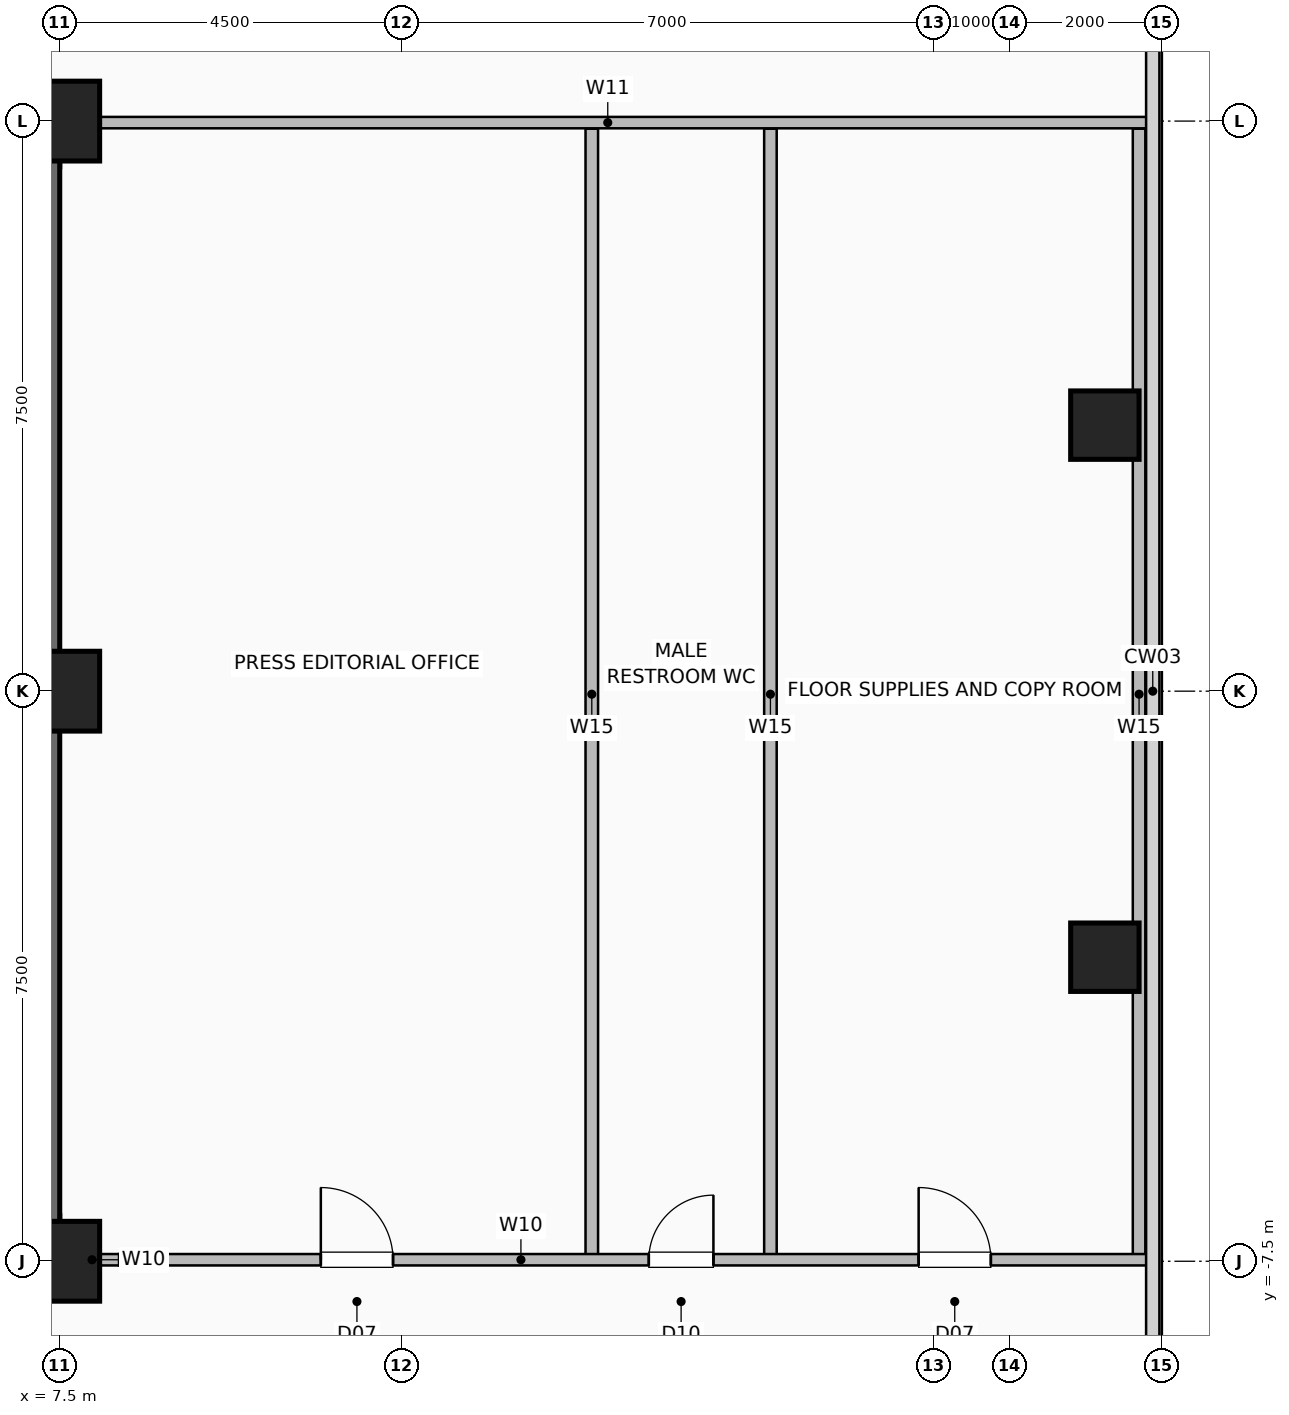
"""IFC4 building model, lengths in metres.
Left out: names, types, materials, properties, quantities, classifications, styles, units other than length and angle.
Written with IfcOpenShell. Run it as: python <this file> out.ifc"""

import sys

from ifc_helpers import new_model, si_unit, direction, frame, frame_2d, origin, origin_2d, place, context, subcontext, project, spatial, rectangle, hollow_rectangle, extrude, element, fill, save


model = new_model("IFC4")
c1 = context("Model", 3, precision=1e-05, world=origin(), true_north=direction((0.0, 1.0)))
c2 = subcontext(c1, "Body", "Model", "MODEL_VIEW")
j1 = project(units=[si_unit("LENGTHUNIT", "METRE"), si_unit("PLANEANGLEUNIT", "RADIAN")], contexts=[c1])
p1 = place(None, origin())
s1 = spatial("IfcSite", under=j1, at=p1, CompositionType="ELEMENT")
p2 = place(p1, origin())
s2 = spatial("IfcBuilding", under=s1, at=p2, CompositionType="ELEMENT")
p3 = place(p2, frame((0.0, 0.0, 119.2)))
s3 = spatial("IfcBuildingStorey", under=s2, at=p3, CompositionType="ELEMENT", Elevation=119.2)
for number, where, z_axis, x_axis in (
    (1, (7.5, -7.5, 0.0), (0.0, 0.0, 1.0), (1.0, 0.0, 0.0)),
    (2, (7.5, 0.0, 0.0), (0.0, 0.0, 1.0), (1.0, 0.0, 0.0)),
    (3, (7.5, 7.5, 0.0), (0.0, 0.0, 1.0), (1.0, 0.0, 0.0)),
):
    element("IfcColumn", number, at=place(p3, frame(where, z_axis=z_axis, x_axis=x_axis)), inside=s3, PredefinedType="COLUMN", context=c2, shape_type="SweptSolid", body=[
        extrude(hollow_rectangle(XDim=1.05, YDim=1.05, WallThickness=0.05, at=origin_2d()), origin(), (0.0, 0.0, 1.0), 3.6),
    ])
for number, where, z_axis, x_axis in (
    (4, (21.25, -3.5, 0.0), (0.0, 0.0, 1.0), (1.0, 0.0, 0.0)),
    (5, (21.25, 3.5, 0.0), (0.0, 0.0, 1.0), (1.0, 0.0, 0.0)),
):
    element("IfcColumn", number, at=place(p3, frame(where, z_axis=z_axis, x_axis=x_axis)), inside=s3, PredefinedType="COLUMN", context=c2, shape_type="SweptSolid", body=[
        extrude(hollow_rectangle(XDim=0.9, YDim=0.9, WallThickness=0.045, at=origin_2d()), origin(), (0.0, 0.0, 1.0), 3.6),
    ])
p4 = place(p3, frame((-7.5, -7.2, 0.0), z_axis=(0.0, 0.0, 1.0), x_axis=(1.0, 0.0, 0.0)))
e6 = element("IfcWall", 6, at=p4, inside=s3, PredefinedType="SHEAR", context=c2, shape_type="SweptSolid", body=[
    extrude(rectangle(XDim=15.0, YDim=0.6, at=frame_2d((7.5, 0.0))), origin(), (0.0, 0.0, 1.0), 3.36),
])
p5 = place(p4, frame((1.55, 0.0, 0.0)))
e7 = element("IfcOpeningElement", 7, at=p5, cuts=e6, PredefinedType="OPENING", context=c2, shape_type="SweptSolid", body=[
    extrude(rectangle(XDim=1.05, YDim=2.08, at=frame_2d((0.525, 1.04))), frame((0.0, 0.31, 0.0), z_axis=(0.0, -1.0, 0.0), x_axis=(1.0, 0.0, 0.0)), (0.0, 0.0, 1.0), 0.62),
])
p6 = place(p4, frame((12.4, 0.0, 0.0)))
e8 = element("IfcOpeningElement", 8, at=p6, cuts=e6, PredefinedType="OPENING", context=c2, shape_type="SweptSolid", body=[
    extrude(rectangle(XDim=1.05, YDim=2.08, at=frame_2d((0.525, 1.04))), frame((0.0, 0.31, 0.0), z_axis=(0.0, -1.0, 0.0), x_axis=(1.0, 0.0, 0.0)), (0.0, 0.0, 1.0), 0.62),
])
p7 = place(p4, frame((5.2, 0.0, 0.0)))
e9 = element("IfcOpeningElement", 9, at=p7, cuts=e6, PredefinedType="OPENING", context=c2, shape_type="SweptSolid", body=[
    extrude(rectangle(XDim=1.0, YDim=2.08, at=frame_2d((0.5, 1.04))), frame((0.0, 0.31, 0.0), z_axis=(0.0, -1.0, 0.0), x_axis=(1.0, 0.0, 0.0)), (0.0, 0.0, 1.0), 0.62),
])
p8 = place(p4, frame((8.65, 0.0, 0.0)))
e10 = element("IfcOpeningElement", 10, at=p8, cuts=e6, PredefinedType="OPENING", context=c2, shape_type="SweptSolid", body=[
    extrude(rectangle(XDim=1.0, YDim=2.08, at=frame_2d((0.5, 1.04))), frame((0.0, 0.31, 0.0), z_axis=(0.0, -1.0, 0.0), x_axis=(1.0, 0.0, 0.0)), (0.0, 0.0, 1.0), 0.62),
])
for number, where, z_axis, x_axis in (
    (11, (-7.5, 7.2, 0.0), (0.0, 0.0, 1.0), (1.0, 0.0, 0.0)),
    (12, (7.2, -7.5, 0.0), (0.0, 0.0, 1.0), (0.0, 1.0, 0.0)),
):
    element("IfcWall", number, at=place(p3, frame(where, z_axis=z_axis, x_axis=x_axis)), inside=s3, PredefinedType="SHEAR", context=c2, shape_type="SweptSolid", body=[
        extrude(rectangle(XDim=15.0, YDim=0.6, at=frame_2d((7.5, 0.0))), origin(), (0.0, 0.0, 1.0), 3.36),
    ])
p9 = place(p3, frame((7.45, -7.48, 0.0), z_axis=(0.0, 0.0, 1.0), x_axis=(1.0, 0.0, 0.0)))
e13 = element("IfcWall", 13, at=p9, inside=s3, PredefinedType="PARTITIONING", context=c2, shape_type="SweptSolid", body=[
    extrude(rectangle(XDim=0.95, YDim=0.15, at=frame_2d((0.475, 0.0))), origin(), (0.0, 0.0, 1.0), 3.36),
])
for number, where, z_axis, x_axis in (
    (14, (16.85, -7.48, 0.0), (0.0, 0.0, 1.0), (0.0, 1.0, 0.0)),
    (15, (14.5, -7.48, 0.0), (0.0, 0.0, 1.0), (0.0, 1.0, 0.0)),
    (16, (21.7, -7.48, 0.0), (0.0, 0.0, 1.0), (0.0, 1.0, 0.0)),
):
    element("IfcWall", number, at=place(p3, frame(where, z_axis=z_axis, x_axis=x_axis)), inside=s3, PredefinedType="PLUMBINGWALL", context=c2, shape_type="SweptSolid", body=[
        extrude(rectangle(XDim=14.88, YDim=0.165, at=frame_2d((7.44, 0.0))), origin(), (0.0, 0.0, 1.0), 3.36),
    ])
p10 = place(p3, frame((8.28, -7.48, 0.0), z_axis=(0.0, 0.0, 1.0), x_axis=(1.0, 0.0, 0.0)))
e17 = element("IfcWall", 17, at=p10, inside=s3, PredefinedType="PARTITIONING", context=c2, shape_type="SweptSolid", body=[
    extrude(rectangle(XDim=13.54, YDim=0.15, at=frame_2d((6.77, 0.0))), origin(), (0.0, 0.0, 1.0), 3.36),
])
p11 = place(p10, frame((2.655, 0.0, 0.0)))
e18 = element("IfcOpeningElement", 18, at=p11, cuts=e17, PredefinedType="OPENING", context=c2, shape_type="SweptSolid", body=[
    extrude(rectangle(XDim=0.95, YDim=2.06, at=frame_2d((0.475, 1.03))), frame((0.0, 0.085, 0.0), z_axis=(0.0, -1.0, 0.0), x_axis=(1.0, 0.0, 0.0)), (0.0, 0.0, 1.0), 0.17),
])
p12 = place(p10, frame((6.97, 0.0, 0.0)))
e19 = element("IfcOpeningElement", 19, at=p12, cuts=e17, PredefinedType="OPENING", context=c2, shape_type="SweptSolid", body=[
    extrude(rectangle(XDim=0.85, YDim=2.05, at=frame_2d((0.425, 1.025))), frame((0.0, 0.085, 0.0), z_axis=(0.0, -1.0, 0.0), x_axis=(1.0, 0.0, 0.0)), (0.0, 0.0, 1.0), 0.17),
])
p13 = place(p10, frame((10.52, 0.0, 0.0)))
e20 = element("IfcOpeningElement", 20, at=p13, cuts=e17, PredefinedType="OPENING", context=c2, shape_type="SweptSolid", body=[
    extrude(rectangle(XDim=0.95, YDim=2.06, at=frame_2d((0.475, 1.03))), frame((0.0, 0.085, 0.0), z_axis=(0.0, -1.0, 0.0), x_axis=(1.0, 0.0, 0.0)), (0.0, 0.0, 1.0), 0.17),
])
p14 = place(p3, frame((7.6, 7.48, 0.0), z_axis=(0.0, 0.0, 1.0), x_axis=(1.0, 0.0, 0.0)))
e21 = element("IfcWall", 21, at=p14, inside=s3, PredefinedType="PARTITIONING", context=c2, shape_type="SweptSolid", body=[
    extrude(rectangle(XDim=14.22, YDim=0.15, at=frame_2d((7.11, 0.0))), origin(), (0.0, 0.0, 1.0), 3.36),
])
p15 = place(p11, origin())
e22 = element("IfcDoor", 22, at=p15, inside=s3, OperationType="SINGLE_SWING_LEFT", PredefinedType="DOOR", context=c2, shape_type="SweptSolid", body=[
    extrude(rectangle(XDim=0.95, YDim=2.06, at=frame_2d((0.475, 1.03))), frame((0.0, 0.025, 0.0), z_axis=(0.0, -1.0, 0.0), x_axis=(1.0, 0.0, 0.0)), (0.0, 0.0, 1.0), 0.05),
])
fill(e18, e22)
p16 = place(p12, origin())
e23 = element("IfcDoor", 23, at=p16, inside=s3, OperationType="SINGLE_SWING_RIGHT", PredefinedType="DOOR", context=c2, shape_type="SweptSolid", body=[
    extrude(rectangle(XDim=0.85, YDim=2.05, at=frame_2d((0.425, 1.025))), frame((0.0, 0.025, 0.0), z_axis=(0.0, -1.0, 0.0), x_axis=(1.0, 0.0, 0.0)), (0.0, 0.0, 1.0), 0.05),
])
fill(e19, e23)
p17 = place(p13, origin())
e24 = element("IfcDoor", 24, at=p17, inside=s3, OperationType="SINGLE_SWING_LEFT", PredefinedType="DOOR", context=c2, shape_type="SweptSolid", body=[
    extrude(rectangle(XDim=0.95, YDim=2.06, at=frame_2d((0.475, 1.03))), frame((0.0, 0.025, 0.0), z_axis=(0.0, -1.0, 0.0), x_axis=(1.0, 0.0, 0.0)), (0.0, 0.0, 1.0), 0.05),
])
fill(e20, e24)
save(model, sys.argv[1])
